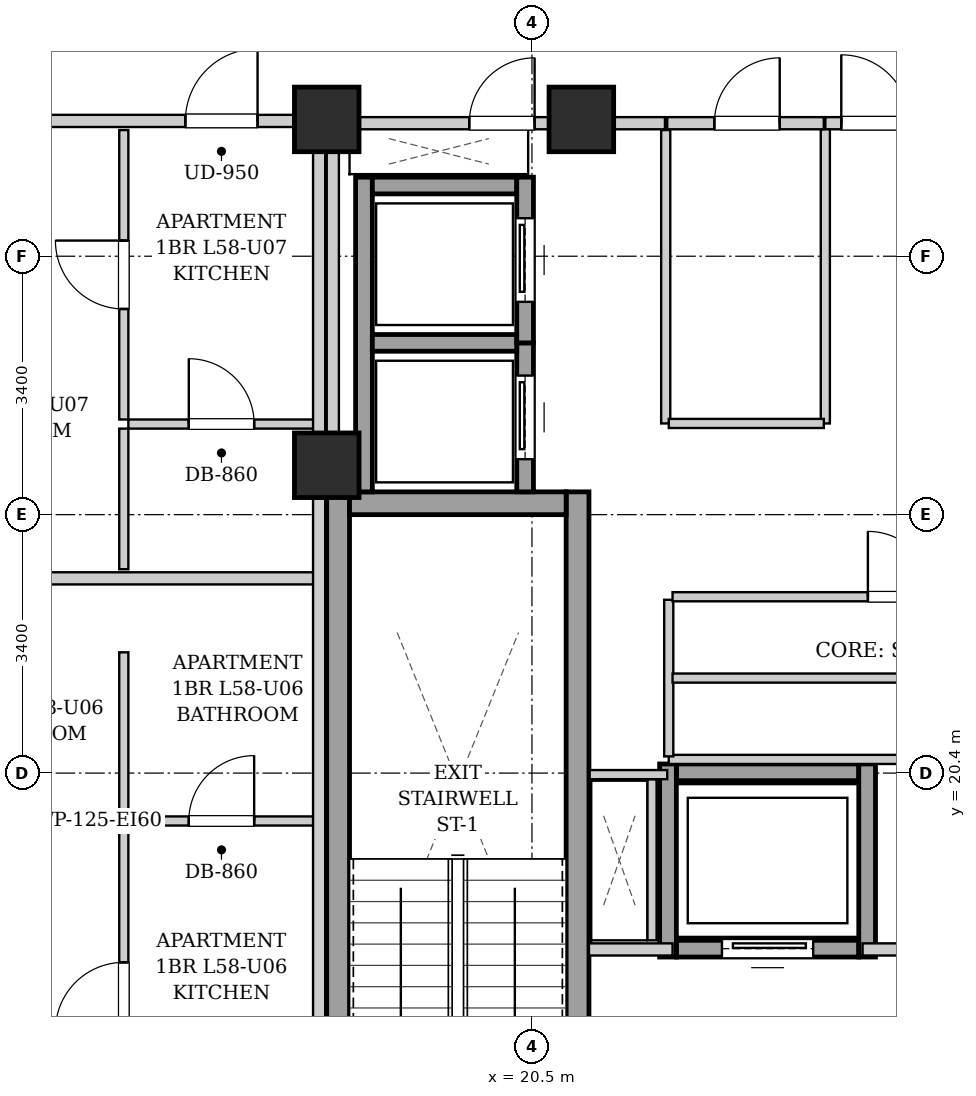
"""IFC4 building model, lengths in metres.
Left out: names, types, materials, properties, quantities, classifications, styles, units other than length and angle.
Written with IfcOpenShell. Run it as: python <this file> out.ifc"""

import sys

from ifc_helpers import new_model, si_unit, direction, frame, frame_2d, origin, origin_2d, place, context, subcontext, project, spatial, rectangle, extrude, element, fill, save


model = new_model("IFC4")
c1 = context("Model", 3, precision=1e-05, world=origin(), true_north=direction((0.0, 1.0)))
c2 = subcontext(c1, "Body", "Model", "MODEL_VIEW")
j1 = project(units=[si_unit("LENGTHUNIT", "METRE"), si_unit("PLANEANGLEUNIT", "RADIAN")], contexts=[c1])
p1 = place(None, origin())
s1 = spatial("IfcSite", under=j1, at=p1, CompositionType="ELEMENT")
p2 = place(p1, origin())
s2 = spatial("IfcBuilding", under=s1, at=p2, CompositionType="ELEMENT")
p3 = place(p2, frame((0.0, 0.0, 200.8)))
s3 = spatial("IfcBuildingStorey", under=s2, at=p3, CompositionType="ELEMENT", Elevation=200.8)
for number, where, z_axis, x_axis in (
    (1, (17.8, 29.0, 0.0), (0.0, 0.0, 1.0), (1.0, 0.0, 0.0)),
    (2, (21.15, 29.0, 0.0), (0.0, 0.0, 1.0), (1.0, 0.0, 0.0)),
    (3, (17.8, 24.45, 0.0), (0.0, 0.0, 1.0), (1.0, 0.0, 0.0)),
):
    element("IfcColumn", number, at=place(p3, frame(where, z_axis=z_axis, x_axis=x_axis)), inside=s3, PredefinedType="COLUMN", context=c2, shape_type="SweptSolid", body=[
        extrude(rectangle(XDim=0.85, YDim=0.85, at=origin_2d()), origin(), (0.0, 0.0, 1.0), 3.3),
    ])
for number, where, z_axis, x_axis in (
    (4, (17.95, 15.1, 0.0), (0.0, 0.0, 1.0), (0.0, 1.0, 0.0)),
    (5, (21.1, 15.1, 0.0), (0.0, 0.0, 1.0), (0.0, 1.0, 0.0)),
):
    element("IfcWall", number, at=place(p3, frame(where, z_axis=z_axis, x_axis=x_axis)), inside=s3, PredefinedType="SHEAR", context=c2, shape_type="SweptSolid", body=[
        extrude(rectangle(XDim=9.0, YDim=0.3, at=frame_2d((4.5, 0.0))), origin(), (0.0, 0.0, 1.0), 3.04),
    ])
p4 = place(p3, frame((18.1, 23.95, 0.0), z_axis=(0.0, 0.0, 1.0), x_axis=(1.0, 0.0, 0.0)))
e6 = element("IfcWall", 6, at=p4, inside=s3, PredefinedType="SHEAR", context=c2, shape_type="SweptSolid", body=[
    extrude(rectangle(XDim=2.85, YDim=0.3, at=frame_2d((1.425, 0.0))), origin(), (0.0, 0.0, 1.0), 3.04),
])
p5 = place(p3, frame((18.29, 24.1, 0.0), z_axis=(0.0, 0.0, 1.0), x_axis=(0.0, 1.0, 0.0)))
e7 = element("IfcWall", 7, at=p5, inside=s3, PredefinedType="SHEAR", context=c2, shape_type="SweptSolid", body=[
    extrude(rectangle(XDim=4.14, YDim=0.22, at=frame_2d((2.07, 0.0))), origin(), (0.0, 0.0, 1.0), 3.04),
])
p6 = place(p3, frame((20.41, 24.1, 0.0), z_axis=(0.0, 0.0, 1.0), x_axis=(0.0, 1.0, 0.0)))
e8 = element("IfcWall", 8, at=p6, inside=s3, PredefinedType="SHEAR", context=c2, shape_type="SweptSolid", body=[
    extrude(rectangle(XDim=1.96, YDim=0.22, at=frame_2d((0.98, 0.0))), origin(), (0.0, 0.0, 1.0), 3.04),
])
p7 = place(p6, frame((0.43, 0.0, 0.0)))
e9 = element("IfcOpeningElement", 9, at=p7, cuts=e8, PredefinedType="OPENING", context=c2, shape_type="SweptSolid", body=[
    extrude(rectangle(XDim=1.1, YDim=2.15, at=frame_2d((0.55, 1.075))), frame((0.0, 0.12, 0.0), z_axis=(0.0, -1.0, 0.0), x_axis=(1.0, 0.0, 0.0)), (0.0, 0.0, 1.0), 0.24),
])
for number, where, z_axis, x_axis in (
    (10, (18.4, 26.06, 0.0), (0.0, 0.0, 1.0), (1.0, 0.0, 0.0)),
    (11, (18.4, 28.13, 0.0), (0.0, 0.0, 1.0), (1.0, 0.0, 0.0)),
):
    element("IfcWall", number, at=place(p3, frame(where, z_axis=z_axis, x_axis=x_axis)), inside=s3, PredefinedType="SHEAR", context=c2, shape_type="SweptSolid", body=[
        extrude(rectangle(XDim=1.9, YDim=0.22, at=frame_2d((0.95, 0.0))), origin(), (0.0, 0.0, 1.0), 3.04),
    ])
p8 = place(p3, frame((20.41, 26.06, 0.0), z_axis=(0.0, 0.0, 1.0), x_axis=(0.0, 1.0, 0.0)))
e12 = element("IfcWall", 12, at=p8, inside=s3, PredefinedType="SHEAR", context=c2, shape_type="SweptSolid", body=[
    extrude(rectangle(XDim=2.18, YDim=0.22, at=frame_2d((1.09, 0.0))), origin(), (0.0, 0.0, 1.0), 3.04),
])
p9 = place(p8, frame((0.54, 0.0, 0.0)))
e13 = element("IfcOpeningElement", 13, at=p9, cuts=e12, PredefinedType="OPENING", context=c2, shape_type="SweptSolid", body=[
    extrude(rectangle(XDim=1.1, YDim=2.15, at=frame_2d((0.55, 1.075))), frame((0.0, 0.12, 0.0), z_axis=(0.0, -1.0, 0.0), x_axis=(1.0, 0.0, 0.0)), (0.0, 0.0, 1.0), 0.24),
])
p10 = place(p3, frame((22.4, 18.09, 0.0), z_axis=(0.0, 0.0, 1.0), x_axis=(1.0, 0.0, 0.0)))
e14 = element("IfcWall", 14, at=p10, inside=s3, PredefinedType="SHEAR", context=c2, shape_type="SweptSolid", body=[
    extrude(rectangle(XDim=2.4, YDim=0.22, at=frame_2d((1.2, 0.0))), origin(), (0.0, 0.0, 1.0), 3.04),
])
p11 = place(p10, frame((0.6, 0.0, 0.0)))
e15 = element("IfcOpeningElement", 15, at=p11, cuts=e14, PredefinedType="OPENING", context=c2, shape_type="SweptSolid", body=[
    extrude(rectangle(XDim=1.2, YDim=2.15, at=frame_2d((0.6, 1.075))), frame((0.0, 0.12, 0.0), z_axis=(0.0, -1.0, 0.0), x_axis=(1.0, 0.0, 0.0)), (0.0, 0.0, 1.0), 0.24),
])
p12 = place(p3, frame((22.4, 20.41, 0.0), z_axis=(0.0, 0.0, 1.0), x_axis=(1.0, 0.0, 0.0)))
e16 = element("IfcWall", 16, at=p12, inside=s3, PredefinedType="SHEAR", context=c2, shape_type="SweptSolid", body=[
    extrude(rectangle(XDim=2.4, YDim=0.22, at=frame_2d((1.2, 0.0))), origin(), (0.0, 0.0, 1.0), 3.04),
])
for number, where, z_axis, x_axis in (
    (17, (22.29, 17.98, 0.0), (0.0, 0.0, 1.0), (0.0, 1.0, 0.0)),
    (18, (24.91, 17.98, 0.0), (0.0, 0.0, 1.0), (0.0, 1.0, 0.0)),
):
    element("IfcWall", number, at=place(p3, frame(where, z_axis=z_axis, x_axis=x_axis)), inside=s3, PredefinedType="SHEAR", context=c2, shape_type="SweptSolid", body=[
        extrude(rectangle(XDim=2.54, YDim=0.22, at=frame_2d((1.27, 0.0))), origin(), (0.0, 0.0, 1.0), 3.04),
    ])
p13 = place(p3, frame((21.25, 18.08, 0.0), z_axis=(0.0, 0.0, 1.0), x_axis=(1.0, 0.0, 0.0)))
e19 = element("IfcWall", 19, at=p13, inside=s3, PredefinedType="PARTITIONING", context=c2, shape_type="SweptSolid", body=[
    extrude(rectangle(XDim=1.1, YDim=0.16, at=frame_2d((0.55, 0.0))), origin(), (0.0, 0.0, 1.0), 3.04),
])
p14 = place(p3, frame((24.85, 18.08, 0.0), z_axis=(0.0, 0.0, 1.0), x_axis=(1.0, 0.0, 0.0)))
e20 = element("IfcWall", 20, at=p14, inside=s3, PredefinedType="PARTITIONING", context=c2, shape_type="SweptSolid", body=[
    extrude(rectangle(XDim=1.3, YDim=0.16, at=frame_2d((0.65, 0.0))), origin(), (0.0, 0.0, 1.0), 3.04),
])
p15 = place(p3, frame((17.88, 24.12, 0.0), z_axis=(0.0, 0.0, 1.0), x_axis=(0.0, 1.0, 0.0)))
e21 = element("IfcWall", 21, at=p15, inside=s3, PredefinedType="PARTITIONING", context=c2, shape_type="SweptSolid", body=[
    extrude(rectangle(XDim=4.76, YDim=0.16, at=frame_2d((2.38, 0.0))), origin(), (0.0, 0.0, 1.0), 3.04),
])
p16 = place(p3, frame((24.36, 28.95, 0.0), z_axis=(0.0, 0.0, 1.0), x_axis=(1.0, 0.0, 0.0)))
e22 = element("IfcWall", 22, at=p16, inside=s3, PredefinedType="PARTITIONING", context=c2, shape_type="SweptSolid", body=[
    extrude(rectangle(XDim=1.32, YDim=0.16, at=frame_2d((0.66, 0.0))), origin(), (0.0, 0.0, 1.0), 2.556),
])
p17 = place(p16, frame((0.21, 0.0, 0.0)))
e23 = element("IfcOpeningElement", 23, at=p17, cuts=e22, PredefinedType="OPENING", context=c2, shape_type="SweptSolid", body=[
    extrude(rectangle(XDim=0.9, YDim=2.05, at=frame_2d((0.45, 1.025))), frame((0.0, 0.09, 0.0), z_axis=(0.0, -1.0, 0.0), x_axis=(1.0, 0.0, 0.0)), (0.0, 0.0, 1.0), 0.18),
])
p18 = place(p3, frame((17.96, 28.95, 0.0), z_axis=(0.0, 0.0, 1.0), x_axis=(1.0, 0.0, 0.0)))
e24 = element("IfcWall", 24, at=p18, inside=s3, PredefinedType="PARTITIONING", context=c2, shape_type="SweptSolid", body=[
    extrude(rectangle(XDim=4.29, YDim=0.16, at=frame_2d((2.145, 0.0))), origin(), (0.0, 0.0, 1.0), 2.556),
])
p19 = place(p18, frame((1.715, 0.0, 0.0)))
e25 = element("IfcOpeningElement", 25, at=p19, cuts=e24, PredefinedType="OPENING", context=c2, shape_type="SweptSolid", body=[
    extrude(rectangle(XDim=0.86, YDim=2.05, at=frame_2d((0.43, 1.025))), frame((0.0, 0.09, 0.0), z_axis=(0.0, -1.0, 0.0), x_axis=(1.0, 0.0, 0.0)), (0.0, 0.0, 1.0), 0.18),
])
p20 = place(p3, frame((22.08, 18.2, 0.0), z_axis=(0.0, 0.0, 1.0), x_axis=(0.0, 1.0, 0.0)))
e26 = element("IfcWall", 26, at=p20, inside=s3, PredefinedType="PARTITIONING", context=c2, shape_type="SweptSolid", body=[
    extrude(rectangle(XDim=2.12, YDim=0.12, at=frame_2d((1.06, 0.0))), origin(), (0.0, 0.0, 1.0), 3.04),
])
p21 = place(p3, frame((22.28, 20.38, 0.0), z_axis=(0.0, 0.0, 1.0), x_axis=(-1.0, 0.0, 0.0)))
e27 = element("IfcWall", 27, at=p21, inside=s3, PredefinedType="PARTITIONING", context=c2, shape_type="SweptSolid", body=[
    extrude(rectangle(XDim=1.02, YDim=0.12, at=frame_2d((0.51, 0.0))), origin(), (0.0, 0.0, 1.0), 3.04),
])
p22 = place(p3, frame((24.36, 25.0, 0.0), z_axis=(0.0, 0.0, 1.0), x_axis=(0.0, 1.0, 0.0)))
e28 = element("IfcWall", 28, at=p22, inside=s3, PredefinedType="PARTITIONING", context=c2, shape_type="SweptSolid", body=[
    extrude(rectangle(XDim=3.87, YDim=0.12, at=frame_2d((1.935, 0.0))), origin(), (0.0, 0.0, 1.0), 3.04),
])
p23 = place(p3, frame((22.26, 25.0, 0.0), z_axis=(0.0, 0.0, 1.0), x_axis=(0.0, 1.0, 0.0)))
e29 = element("IfcWall", 29, at=p23, inside=s3, PredefinedType="PARTITIONING", context=c2, shape_type="SweptSolid", body=[
    extrude(rectangle(XDim=3.86, YDim=0.12, at=frame_2d((1.93, 0.0))), origin(), (0.0, 0.0, 1.0), 3.04),
])
p24 = place(p3, frame((22.3, 25.0, 0.0), z_axis=(0.0, 0.0, 1.0), x_axis=(1.0, 0.0, 0.0)))
e30 = element("IfcWall", 30, at=p24, inside=s3, PredefinedType="PARTITIONING", context=c2, shape_type="SweptSolid", body=[
    extrude(rectangle(XDim=2.04, YDim=0.12, at=frame_2d((1.02, 0.0))), origin(), (0.0, 0.0, 1.0), 3.04),
])
p25 = place(p3, frame((22.28, 28.95, 0.0), z_axis=(0.0, 0.0, 1.0), x_axis=(1.0, 0.0, 0.0)))
e31 = element("IfcWall", 31, at=p25, inside=s3, PredefinedType="PARTITIONING", context=c2, shape_type="SweptSolid", body=[
    extrude(rectangle(XDim=2.06, YDim=0.16, at=frame_2d((1.03, 0.0))), origin(), (0.0, 0.0, 1.0), 2.556),
])
p26 = place(p25, frame((0.62, 0.0, 0.0)))
e32 = element("IfcOpeningElement", 32, at=p26, cuts=e31, PredefinedType="OPENING", context=c2, shape_type="SweptSolid", body=[
    extrude(rectangle(XDim=0.86, YDim=2.05, at=frame_2d((0.43, 1.025))), frame((0.0, 0.09, 0.0), z_axis=(0.0, -1.0, 0.0), x_axis=(1.0, 0.0, 0.0)), (0.0, 0.0, 1.0), 0.18),
])
p27 = place(p3, frame((22.3, 20.58, 0.0), z_axis=(0.0, 0.0, 1.0), x_axis=(1.0, 0.0, 0.0)))
e33 = element("IfcWall", 33, at=p27, inside=s3, PredefinedType="PARTITIONING", context=c2, shape_type="SweptSolid", body=[
    extrude(rectangle(XDim=7.35, YDim=0.12, at=frame_2d((3.675, 0.0))), origin(), (0.0, 0.0, 1.0), 3.04),
])
p28 = place(p3, frame((22.3, 20.62, 0.0), z_axis=(0.0, 0.0, 1.0), x_axis=(0.0, 1.0, 0.0)))
e34 = element("IfcWall", 34, at=p28, inside=s3, PredefinedType="PARTITIONING", context=c2, shape_type="SweptSolid", body=[
    extrude(rectangle(XDim=2.06, YDim=0.12, at=frame_2d((1.03, 0.0))), origin(), (0.0, 0.0, 1.0), 3.04),
])
p29 = place(p3, frame((22.35, 21.65, 0.0), z_axis=(0.0, 0.0, 1.0), x_axis=(1.0, 0.0, 0.0)))
e35 = element("IfcWall", 35, at=p29, inside=s3, PredefinedType="PARTITIONING", context=c2, shape_type="SweptSolid", body=[
    extrude(rectangle(XDim=5.79, YDim=0.12, at=frame_2d((2.895, 0.0))), origin(), (0.0, 0.0, 1.0), 3.04),
])
p30 = place(p3, frame((22.35, 22.72, 0.0), z_axis=(0.0, 0.0, 1.0), x_axis=(1.0, 0.0, 0.0)))
e36 = element("IfcWall", 36, at=p30, inside=s3, PredefinedType="PARTITIONING", context=c2, shape_type="SweptSolid", body=[
    extrude(rectangle(XDim=7.27, YDim=0.12, at=frame_2d((3.635, 0.0))), origin(), (0.0, 0.0, 1.0), 3.04),
])
p31 = place(p30, frame((2.57, 0.0, 0.0)))
e37 = element("IfcOpeningElement", 37, at=p31, cuts=e36, PredefinedType="OPENING", context=c2, shape_type="SweptSolid", body=[
    extrude(rectangle(XDim=0.86, YDim=2.05, at=frame_2d((0.43, 1.025))), frame((0.0, 0.07, 0.0), z_axis=(0.0, -1.0, 0.0), x_axis=(1.0, 0.0, 0.0)), (0.0, 0.0, 1.0), 0.14),
])
p32 = place(p30, frame((6.06, 0.0, 0.0)))
e38 = element("IfcOpeningElement", 38, at=p32, cuts=e36, PredefinedType="OPENING", context=c2, shape_type="SweptSolid", body=[
    extrude(rectangle(XDim=0.86, YDim=2.05, at=frame_2d((0.43, 1.025))), frame((0.0, 0.07, 0.0), z_axis=(0.0, -1.0, 0.0), x_axis=(1.0, 0.0, 0.0)), (0.0, 0.0, 1.0), 0.14),
])
p33 = place(p3, frame((10.88, 22.962, 0.0), z_axis=(0.0, 0.0, 1.0), x_axis=(1.0, 0.0, 0.0)))
e39 = element("IfcWall", 39, at=p33, inside=s3, PredefinedType="PARTITIONING", context=c2, shape_type="SweptSolid", body=[
    extrude(rectangle(XDim=6.76, YDim=0.16, at=frame_2d((3.38, 0.0))), origin(), (0.0, 0.0, 1.0), 3.04),
])
p34 = place(p3, frame((15.19, 19.77, 0.0), z_axis=(0.0, 0.0, 1.0), x_axis=(1.0, 0.0, 0.0)))
e40 = element("IfcWall", 40, at=p34, inside=s3, PredefinedType="PARTITIONING", context=c2, shape_type="SweptSolid", body=[
    extrude(rectangle(XDim=2.45, YDim=0.12, at=frame_2d((1.225, 0.0))), origin(), (0.0, 0.0, 1.0), 3.04),
])
p35 = place(p34, frame((0.795, 0.0, 0.0)))
e41 = element("IfcOpeningElement", 41, at=p35, cuts=e40, PredefinedType="OPENING", context=c2, shape_type="SweptSolid", body=[
    extrude(rectangle(XDim=0.86, YDim=2.05, at=frame_2d((0.43, 1.025))), frame((0.0, 0.07, 0.0), z_axis=(0.0, -1.0, 0.0), x_axis=(1.0, 0.0, 0.0)), (0.0, 0.0, 1.0), 0.14),
])
p36 = place(p3, frame((15.13, 19.83, 0.0), z_axis=(0.0, 0.0, 1.0), x_axis=(0.0, 1.0, 0.0)))
e42 = element("IfcWall", 42, at=p36, inside=s3, PredefinedType="PARTITIONING", context=c2, shape_type="SweptSolid", body=[
    extrude(rectangle(XDim=2.159, YDim=0.12, at=frame_2d((1.08, 0.0))), origin(), (0.0, 0.0, 1.0), 3.04),
])
p37 = place(p3, frame((15.13, 15.21, 0.0), z_axis=(0.0, 0.0, 1.0), x_axis=(0.0, 1.0, 0.0)))
e43 = element("IfcWall", 43, at=p37, inside=s3, PredefinedType="PARTITIONING", context=c2, shape_type="SweptSolid", body=[
    extrude(rectangle(XDim=4.5, YDim=0.12, at=frame_2d((2.25, 0.0))), origin(), (0.0, 0.0, 1.0), 3.04),
])
p38 = place(p37, frame((1.8, 0.0, 0.0)))
e44 = element("IfcOpeningElement", 44, at=p38, cuts=e43, PredefinedType="OPENING", context=c2, shape_type="SweptSolid", body=[
    extrude(rectangle(XDim=0.9, YDim=2.05, at=frame_2d((0.45, 1.025))), frame((0.0, 0.07, 0.0), z_axis=(0.0, -1.0, 0.0), x_axis=(1.0, 0.0, 0.0)), (0.0, 0.0, 1.0), 0.14),
])
p39 = place(p3, frame((10.88, 28.98, 0.0), z_axis=(0.0, 0.0, 1.0), x_axis=(1.0, 0.0, 0.0)))
e45 = element("IfcWall", 45, at=p39, inside=s3, PredefinedType="PARTITIONING", context=c2, shape_type="SweptSolid", body=[
    extrude(rectangle(XDim=6.88, YDim=0.16, at=frame_2d((3.44, 0.0))), origin(), (0.0, 0.0, 1.0), 2.556),
])
p40 = place(p39, frame((5.06, 0.0, 0.0)))
e46 = element("IfcOpeningElement", 46, at=p40, cuts=e45, PredefinedType="OPENING", context=c2, shape_type="SweptSolid", body=[
    extrude(rectangle(XDim=0.95, YDim=2.1, at=frame_2d((0.475, 1.05))), frame((0.0, 0.09, 0.0), z_axis=(0.0, -1.0, 0.0), x_axis=(1.0, 0.0, 0.0)), (0.0, 0.0, 1.0), 0.18),
])
p41 = place(p3, frame((15.19, 24.992, 0.0), z_axis=(0.0, 0.0, 1.0), x_axis=(1.0, 0.0, 0.0)))
e47 = element("IfcWall", 47, at=p41, inside=s3, PredefinedType="PARTITIONING", context=c2, shape_type="SweptSolid", body=[
    extrude(rectangle(XDim=2.45, YDim=0.12, at=frame_2d((1.225, 0.0))), origin(), (0.0, 0.0, 1.0), 3.04),
])
p42 = place(p41, frame((0.795, 0.0, 0.0)))
e48 = element("IfcOpeningElement", 48, at=p42, cuts=e47, PredefinedType="OPENING", context=c2, shape_type="SweptSolid", body=[
    extrude(rectangle(XDim=0.86, YDim=2.05, at=frame_2d((0.43, 1.025))), frame((0.0, 0.07, 0.0), z_axis=(0.0, -1.0, 0.0), x_axis=(1.0, 0.0, 0.0)), (0.0, 0.0, 1.0), 0.14),
])
p43 = place(p3, frame((15.13, 23.082, 0.0), z_axis=(0.0, 0.0, 1.0), x_axis=(0.0, 1.0, 0.0)))
e49 = element("IfcWall", 49, at=p43, inside=s3, PredefinedType="PARTITIONING", context=c2, shape_type="SweptSolid", body=[
    extrude(rectangle(XDim=1.85, YDim=0.12, at=frame_2d((0.925, 0.0))), origin(), (0.0, 0.0, 1.0), 3.04),
])
p44 = place(p3, frame((15.13, 25.052, 0.0), z_axis=(0.0, 0.0, 1.0), x_axis=(0.0, 1.0, 0.0)))
e50 = element("IfcWall", 50, at=p44, inside=s3, PredefinedType="PARTITIONING", context=c2, shape_type="SweptSolid", body=[
    extrude(rectangle(XDim=3.808, YDim=0.12, at=frame_2d((1.904, 0.0))), origin(), (0.0, 0.0, 1.0), 3.04),
])
p45 = place(p44, frame((1.454, 0.0, 0.0)))
e51 = element("IfcOpeningElement", 51, at=p45, cuts=e50, PredefinedType="OPENING", context=c2, shape_type="SweptSolid", body=[
    extrude(rectangle(XDim=0.9, YDim=2.05, at=frame_2d((0.45, 1.025))), frame((0.0, 0.07, 0.0), z_axis=(0.0, -1.0, 0.0), x_axis=(1.0, 0.0, 0.0)), (0.0, 0.0, 1.0), 0.14),
])
p46 = place(p3, frame((17.7, 15.02, 0.0), z_axis=(0.0, 0.0, 1.0), x_axis=(0.0, 1.0, 0.0)))
e52 = element("IfcWall", 52, at=p46, inside=s3, PredefinedType="PARTITIONING", context=c2, shape_type="SweptSolid", body=[
    extrude(rectangle(XDim=13.98, YDim=0.16, at=frame_2d((6.99, 0.0))), origin(), (0.0, 0.0, 1.0), 3.04),
])
p47 = place(p7, origin())
e53 = element("IfcDoor", 53, at=p47, inside=s3, OperationType="SLIDING_TO_LEFT", PredefinedType="DOOR", context=c2, shape_type="SweptSolid", body=[
    extrude(rectangle(XDim=1.1, YDim=2.15, at=frame_2d((0.55, 1.075))), frame((0.0, 0.025, 0.0), z_axis=(0.0, -1.0, 0.0), x_axis=(1.0, 0.0, 0.0)), (0.0, 0.0, 1.0), 0.05),
])
fill(e9, e53)
p48 = place(p9, origin())
e54 = element("IfcDoor", 54, at=p48, inside=s3, OperationType="SLIDING_TO_LEFT", PredefinedType="DOOR", context=c2, shape_type="SweptSolid", body=[
    extrude(rectangle(XDim=1.1, YDim=2.15, at=frame_2d((0.55, 1.075))), frame((0.0, 0.025, 0.0), z_axis=(0.0, -1.0, 0.0), x_axis=(1.0, 0.0, 0.0)), (0.0, 0.0, 1.0), 0.05),
])
fill(e13, e54)
p49 = place(p11, origin())
e55 = element("IfcDoor", 55, at=p49, inside=s3, OperationType="SLIDING_TO_LEFT", PredefinedType="DOOR", context=c2, shape_type="SweptSolid", body=[
    extrude(rectangle(XDim=1.2, YDim=2.15, at=frame_2d((0.6, 1.075))), frame((0.0, 0.025, 0.0), z_axis=(0.0, -1.0, 0.0), x_axis=(1.0, 0.0, 0.0)), (0.0, 0.0, 1.0), 0.05),
])
fill(e15, e55)
p50 = place(p17, origin())
e56 = element("IfcDoor", 56, at=p50, inside=s3, OperationType="SINGLE_SWING_LEFT", PredefinedType="DOOR", context=c2, shape_type="SweptSolid", body=[
    extrude(rectangle(XDim=0.9, YDim=2.05, at=frame_2d((0.45, 1.025))), frame((0.0, 0.025, 0.0), z_axis=(0.0, -1.0, 0.0), x_axis=(1.0, 0.0, 0.0)), (0.0, 0.0, 1.0), 0.05),
])
fill(e23, e56)
p51 = place(p19, origin())
e57 = element("IfcDoor", 57, at=p51, inside=s3, OperationType="SINGLE_SWING_RIGHT", PredefinedType="DOOR", context=c2, shape_type="SweptSolid", body=[
    extrude(rectangle(XDim=0.86, YDim=2.05, at=frame_2d((0.43, 1.025))), frame((0.0, 0.025, 0.0), z_axis=(0.0, -1.0, 0.0), x_axis=(1.0, 0.0, 0.0)), (0.0, 0.0, 1.0), 0.05),
])
fill(e25, e57)
p52 = place(p26, origin())
e58 = element("IfcDoor", 58, at=p52, inside=s3, OperationType="SINGLE_SWING_RIGHT", PredefinedType="DOOR", context=c2, shape_type="SweptSolid", body=[
    extrude(rectangle(XDim=0.86, YDim=2.05, at=frame_2d((0.43, 1.025))), frame((0.0, 0.025, 0.0), z_axis=(0.0, -1.0, 0.0), x_axis=(1.0, 0.0, 0.0)), (0.0, 0.0, 1.0), 0.05),
])
fill(e32, e58)
p53 = place(p31, origin())
e59 = element("IfcDoor", 59, at=p53, inside=s3, OperationType="SINGLE_SWING_LEFT", PredefinedType="DOOR", context=c2, shape_type="SweptSolid", body=[
    extrude(rectangle(XDim=0.86, YDim=2.05, at=frame_2d((0.43, 1.025))), frame((0.0, 0.025, 0.0), z_axis=(0.0, -1.0, 0.0), x_axis=(1.0, 0.0, 0.0)), (0.0, 0.0, 1.0), 0.05),
])
fill(e37, e59)
p54 = place(p35, origin())
e60 = element("IfcDoor", 60, at=p54, inside=s3, OperationType="SINGLE_SWING_RIGHT", PredefinedType="DOOR", context=c2, shape_type="SweptSolid", body=[
    extrude(rectangle(XDim=0.86, YDim=2.05, at=frame_2d((0.43, 1.025))), frame((0.0, 0.025, 0.0), z_axis=(0.0, -1.0, 0.0), x_axis=(1.0, 0.0, 0.0)), (0.0, 0.0, 1.0), 0.05),
])
fill(e41, e60)
p55 = place(p38, origin())
e61 = element("IfcDoor", 61, at=p55, inside=s3, OperationType="SINGLE_SWING_LEFT", PredefinedType="DOOR", context=c2, shape_type="SweptSolid", body=[
    extrude(rectangle(XDim=0.9, YDim=2.05, at=frame_2d((0.45, 1.025))), frame((0.0, 0.025, 0.0), z_axis=(0.0, -1.0, 0.0), x_axis=(1.0, 0.0, 0.0)), (0.0, 0.0, 1.0), 0.05),
])
fill(e44, e61)
p56 = place(p40, origin())
e62 = element("IfcDoor", 62, at=p56, inside=s3, OperationType="SINGLE_SWING_RIGHT", PredefinedType="DOOR", context=c2, shape_type="SweptSolid", body=[
    extrude(rectangle(XDim=0.95, YDim=2.1, at=frame_2d((0.475, 1.05))), frame((0.0, 0.025, 0.0), z_axis=(0.0, -1.0, 0.0), x_axis=(1.0, 0.0, 0.0)), (0.0, 0.0, 1.0), 0.05),
])
fill(e46, e62)
p57 = place(p42, origin())
e63 = element("IfcDoor", 63, at=p57, inside=s3, OperationType="SINGLE_SWING_LEFT", PredefinedType="DOOR", context=c2, shape_type="SweptSolid", body=[
    extrude(rectangle(XDim=0.86, YDim=2.05, at=frame_2d((0.43, 1.025))), frame((0.0, 0.025, 0.0), z_axis=(0.0, -1.0, 0.0), x_axis=(1.0, 0.0, 0.0)), (0.0, 0.0, 1.0), 0.05),
])
fill(e48, e63)
p58 = place(p45, origin())
e64 = element("IfcDoor", 64, at=p58, inside=s3, OperationType="SINGLE_SWING_RIGHT", PredefinedType="DOOR", context=c2, shape_type="SweptSolid", body=[
    extrude(rectangle(XDim=0.9, YDim=2.05, at=frame_2d((0.45, 1.025))), frame((0.0, 0.025, 0.0), z_axis=(0.0, -1.0, 0.0), x_axis=(1.0, 0.0, 0.0)), (0.0, 0.0, 1.0), 0.05),
])
fill(e51, e64)
save(model, sys.argv[1])
